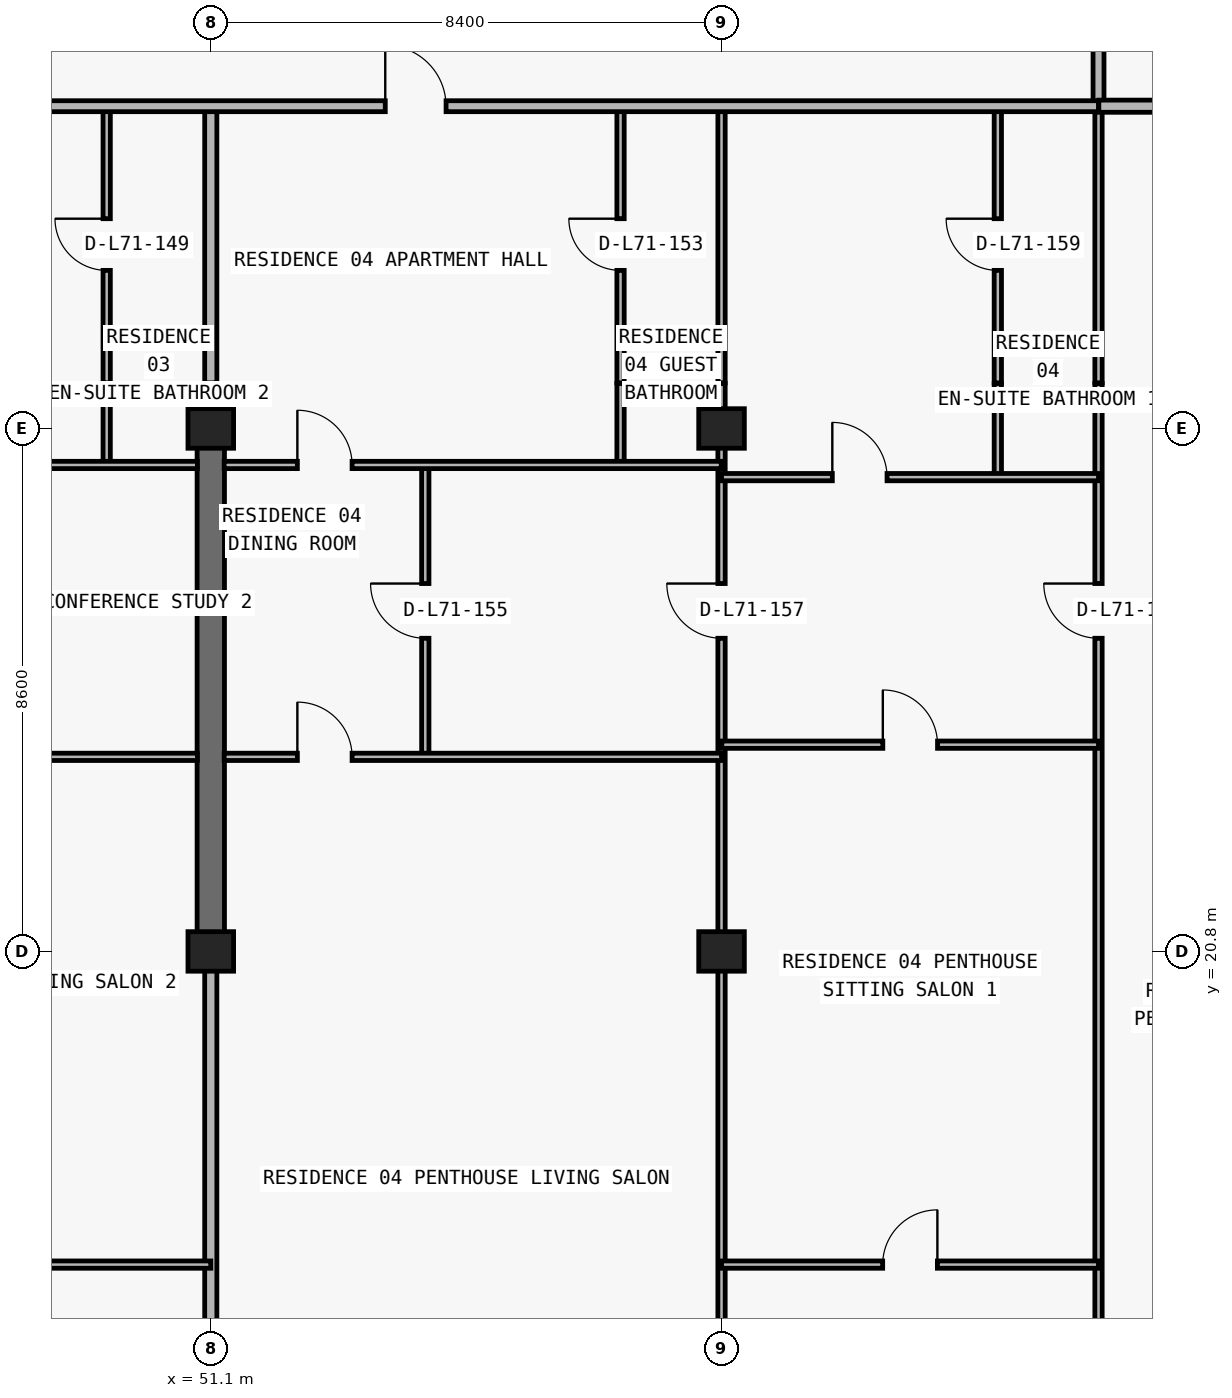
"""IFC4 building model, lengths in metres.
Left out: names, types, materials, properties, quantities, classifications, styles, units other than length and angle.
Written with IfcOpenShell. Run it as: python <this file> out.ifc"""

import sys

from ifc_helpers import new_model, si_unit, direction, frame, frame_2d, origin, origin_2d, place, context, subcontext, project, spatial, rectangle, extrude, element, fill, save


model = new_model("IFC4")
c1 = context("Model", 3, precision=1e-05, world=origin(), true_north=direction((0.0, 1.0)))
c2 = subcontext(c1, "Body", "Model", "MODEL_VIEW")
j1 = project(units=[si_unit("LENGTHUNIT", "METRE"), si_unit("PLANEANGLEUNIT", "RADIAN")], contexts=[c1])
p1 = place(None, origin())
s1 = spatial("IfcSite", under=j1, at=p1, CompositionType="ELEMENT")
p2 = place(p1, origin())
s2 = spatial("IfcBuilding", under=s1, at=p2, CompositionType="ELEMENT")
p3 = place(p2, frame((0.0, 0.0, 252.9)))
s3 = spatial("IfcBuildingStorey", under=s2, at=p3, CompositionType="ELEMENT", Elevation=252.9)
for number, where, z_axis, x_axis in (
    (1, (51.1, 20.8, 0.0), (0.0, 0.0, 1.0), (1.0, 0.0, 0.0)),
    (2, (59.5, 20.8, 0.0), (0.0, 0.0, 1.0), (1.0, 0.0, 0.0)),
    (3, (51.1, 29.4, 0.0), (0.0, 0.0, 1.0), (1.0, 0.0, 0.0)),
    (4, (59.5, 29.4, 0.0), (0.0, 0.0, 1.0), (1.0, 0.0, 0.0)),
):
    element("IfcColumn", number, at=place(p3, frame(where, z_axis=z_axis, x_axis=x_axis)), inside=s3, PredefinedType="COLUMN", context=c2, shape_type="SweptSolid", body=[
        extrude(rectangle(XDim=0.75, YDim=0.65, at=origin_2d()), origin(), (0.0, 0.0, 1.0), 3.05),
    ])
p4 = place(p3, frame((51.1, 20.8, 0.0), z_axis=(0.0, 0.0, 1.0), x_axis=(0.0, 1.0, 0.0)))
e5 = element("IfcWall", 5, at=p4, inside=s3, PredefinedType="SHEAR", context=c2, shape_type="SweptSolid", body=[
    extrude(rectangle(XDim=8.6, YDim=0.45, at=frame_2d((4.3, 0.0))), origin(), (0.0, 0.0, 1.0), 3.05),
])
p5 = place(p3, frame((49.388, 28.8, 0.0), z_axis=(0.0, 0.0, 1.0), x_axis=(0.0, 1.0, 0.0)))
e6 = element("IfcWall", 6, at=p5, inside=s3, PredefinedType="PARTITIONING", context=c2, shape_type="SweptSolid", body=[
    extrude(rectangle(XDim=1.34, YDim=0.12, at=frame_2d((0.67, 0.0))), origin(), (0.0, 0.0, 1.0), 3.05),
])
p6 = place(p3, frame((49.388, 30.15, 0.0), z_axis=(0.0, 0.0, 1.0), x_axis=(0.0, 1.0, 0.0)))
e7 = element("IfcWall", 7, at=p6, inside=s3, PredefinedType="PARTITIONING", context=c2, shape_type="SweptSolid", body=[
    extrude(rectangle(XDim=4.55, YDim=0.12, at=frame_2d((2.275, 0.0))), origin(), (0.0, 0.0, 1.0), 3.05),
])
p7 = place(p6, frame((1.85, 0.0, 0.0)))
e8 = element("IfcOpeningElement", 8, at=p7, cuts=e7, PredefinedType="OPENING", context=c2, shape_type="SweptSolid", body=[
    extrude(rectangle(XDim=0.85, YDim=2.1, at=frame_2d((0.425, 1.05))), frame((0.0, 0.07, 0.0), z_axis=(0.0, -1.0, 0.0), x_axis=(1.0, 0.0, 0.0)), (0.0, 0.0, 1.0), 0.14),
])
p8 = place(p3, frame((51.1, 13.34, 0.0), z_axis=(0.0, 0.0, 1.0), x_axis=(0.0, 1.0, 0.0)))
e9 = element("IfcWall", 9, at=p8, inside=s3, PredefinedType="PARTITIONING", context=c2, shape_type="SweptSolid", body=[
    extrude(rectangle(XDim=7.455, YDim=0.2, at=frame_2d((3.728, 0.0))), origin(), (0.0, 0.0, 1.0), 2.263),
])
p9 = place(p3, frame((51.1, 29.405, 0.0), z_axis=(0.0, 0.0, 1.0), x_axis=(0.0, 1.0, 0.0)))
e10 = element("IfcWall", 10, at=p9, inside=s3, PredefinedType="PARTITIONING", context=c2, shape_type="SweptSolid", body=[
    extrude(rectangle(XDim=0.735, YDim=0.2, at=frame_2d((0.367, 0.0))), origin(), (0.0, 0.0, 1.0), 2.335),
])
p10 = place(p3, frame((51.1, 30.15, 0.0), z_axis=(0.0, 0.0, 1.0), x_axis=(0.0, 1.0, 0.0)))
e11 = element("IfcWall", 11, at=p10, inside=s3, PredefinedType="PARTITIONING", context=c2, shape_type="SweptSolid", body=[
    extrude(rectangle(XDim=4.55, YDim=0.2, at=frame_2d((2.275, 0.0))), origin(), (0.0, 0.0, 1.0), 2.335),
])
p11 = place(p3, frame((54.628, 24.0, 0.0), z_axis=(0.0, 0.0, 1.0), x_axis=(0.0, 1.0, 0.0)))
e12 = element("IfcWall", 12, at=p11, inside=s3, PredefinedType="PARTITIONING", context=c2, shape_type="SweptSolid", body=[
    extrude(rectangle(XDim=4.8, YDim=0.12, at=frame_2d((2.4, 0.0))), origin(), (0.0, 0.0, 1.0), 3.05),
])
p12 = place(p11, frame((1.95, 0.0, 0.0)))
e13 = element("IfcOpeningElement", 13, at=p12, cuts=e12, PredefinedType="OPENING", context=c2, shape_type="SweptSolid", body=[
    extrude(rectangle(XDim=0.9, YDim=2.15, at=frame_2d((0.45, 1.075))), frame((0.0, 0.07, 0.0), z_axis=(0.0, -1.0, 0.0), x_axis=(1.0, 0.0, 0.0)), (0.0, 0.0, 1.0), 0.14),
])
p13 = place(p3, frame((57.839, 28.8, 0.0), z_axis=(0.0, 0.0, 1.0), x_axis=(0.0, 1.0, 0.0)))
e14 = element("IfcWall", 14, at=p13, inside=s3, PredefinedType="PARTITIONING", context=c2, shape_type="SweptSolid", body=[
    extrude(rectangle(XDim=1.34, YDim=0.12, at=frame_2d((0.67, 0.0))), origin(), (0.0, 0.0, 1.0), 3.05),
])
p14 = place(p3, frame((57.839, 30.15, 0.0), z_axis=(0.0, 0.0, 1.0), x_axis=(0.0, 1.0, 0.0)))
e15 = element("IfcWall", 15, at=p14, inside=s3, PredefinedType="PARTITIONING", context=c2, shape_type="SweptSolid", body=[
    extrude(rectangle(XDim=4.55, YDim=0.12, at=frame_2d((2.275, 0.0))), origin(), (0.0, 0.0, 1.0), 3.05),
])
p15 = place(p14, frame((1.85, 0.0, 0.0)))
e16 = element("IfcOpeningElement", 16, at=p15, cuts=e15, PredefinedType="OPENING", context=c2, shape_type="SweptSolid", body=[
    extrude(rectangle(XDim=0.85, YDim=2.1, at=frame_2d((0.425, 1.05))), frame((0.0, 0.07, 0.0), z_axis=(0.0, -1.0, 0.0), x_axis=(1.0, 0.0, 0.0)), (0.0, 0.0, 1.0), 0.14),
])
p16 = place(p3, frame((59.5, 13.34, 0.0), z_axis=(0.0, 0.0, 1.0), x_axis=(0.0, 1.0, 0.0)))
e17 = element("IfcWall", 17, at=p16, inside=s3, PredefinedType="PARTITIONING", context=c2, shape_type="SweptSolid", body=[
    extrude(rectangle(XDim=16.8, YDim=0.12, at=frame_2d((8.4, 0.0))), origin(), (0.0, 0.0, 1.0), 2.263),
])
p17 = place(p16, frame((12.61, 0.0, 0.0)))
e18 = element("IfcOpeningElement", 18, at=p17, cuts=e17, PredefinedType="OPENING", context=c2, shape_type="SweptSolid", body=[
    extrude(rectangle(XDim=0.9, YDim=2.15, at=frame_2d((0.45, 1.075))), frame((0.0, 0.07, 0.0), z_axis=(0.0, -1.0, 0.0), x_axis=(1.0, 0.0, 0.0)), (0.0, 0.0, 1.0), 0.14),
])
p18 = place(p3, frame((59.5, 30.15, 0.0), z_axis=(0.0, 0.0, 1.0), x_axis=(0.0, 1.0, 0.0)))
e19 = element("IfcWall", 19, at=p18, inside=s3, PredefinedType="PARTITIONING", context=c2, shape_type="SweptSolid", body=[
    extrude(rectangle(XDim=4.55, YDim=0.12, at=frame_2d((2.275, 0.0))), origin(), (0.0, 0.0, 1.0), 2.263),
])
p19 = place(p3, frame((64.044, 28.6, 0.0), z_axis=(0.0, 0.0, 1.0), x_axis=(0.0, 1.0, 0.0)))
e20 = element("IfcWall", 20, at=p19, inside=s3, PredefinedType="PARTITIONING", context=c2, shape_type="SweptSolid", body=[
    extrude(rectangle(XDim=1.54, YDim=0.12, at=frame_2d((0.77, 0.0))), origin(), (0.0, 0.0, 1.0), 3.05),
])
p20 = place(p3, frame((64.044, 30.15, 0.0), z_axis=(0.0, 0.0, 1.0), x_axis=(0.0, 1.0, 0.0)))
e21 = element("IfcWall", 21, at=p20, inside=s3, PredefinedType="PARTITIONING", context=c2, shape_type="SweptSolid", body=[
    extrude(rectangle(XDim=4.55, YDim=0.12, at=frame_2d((2.275, 0.0))), origin(), (0.0, 0.0, 1.0), 3.05),
])
p21 = place(p20, frame((1.85, 0.0, 0.0)))
e22 = element("IfcOpeningElement", 22, at=p21, cuts=e21, PredefinedType="OPENING", context=c2, shape_type="SweptSolid", body=[
    extrude(rectangle(XDim=0.85, YDim=2.1, at=frame_2d((0.425, 1.05))), frame((0.0, 0.07, 0.0), z_axis=(0.0, -1.0, 0.0), x_axis=(1.0, 0.0, 0.0)), (0.0, 0.0, 1.0), 0.14),
])
p22 = place(p3, frame((65.7, 13.42, 0.0), z_axis=(0.0, 0.0, 1.0), x_axis=(0.0, 1.0, 0.0)))
e23 = element("IfcWall", 23, at=p22, inside=s3, PredefinedType="PARTITIONING", context=c2, shape_type="SweptSolid", body=[
    extrude(rectangle(XDim=16.72, YDim=0.12, at=frame_2d((8.36, 0.0))), origin(), (0.0, 0.0, 1.0), 3.05),
])
p23 = place(p22, frame((12.53, 0.0, 0.0)))
e24 = element("IfcOpeningElement", 24, at=p23, cuts=e23, PredefinedType="OPENING", context=c2, shape_type="SweptSolid", body=[
    extrude(rectangle(XDim=0.9, YDim=2.15, at=frame_2d((0.45, 1.075))), frame((0.0, 0.07, 0.0), z_axis=(0.0, -1.0, 0.0), x_axis=(1.0, 0.0, 0.0)), (0.0, 0.0, 1.0), 0.14),
])
p24 = place(p3, frame((65.7, 30.15, 0.0), z_axis=(0.0, 0.0, 1.0), x_axis=(0.0, 1.0, 0.0)))
e25 = element("IfcWall", 25, at=p24, inside=s3, PredefinedType="PARTITIONING", context=c2, shape_type="SweptSolid", body=[
    extrude(rectangle(XDim=4.55, YDim=0.12, at=frame_2d((2.275, 0.0))), origin(), (0.0, 0.0, 1.0), 3.05),
])
p25 = place(p3, frame((65.7, 34.705, 0.0), z_axis=(0.0, 0.0, 1.0), x_axis=(0.0, 1.0, 0.0)))
e26 = element("IfcWall", 26, at=p25, inside=s3, PredefinedType="PARTITIONING", context=c2, shape_type="SweptSolid", body=[
    extrude(rectangle(XDim=2.295, YDim=0.18, at=frame_2d((1.147, 0.0))), origin(), (0.0, 0.0, 1.0), 3.05),
])
p26 = place(p3, frame((35.1, 15.65, 0.0), z_axis=(0.0, 0.0, 1.0), x_axis=(1.0, 0.0, 0.0)))
e27 = element("IfcWall", 27, at=p26, inside=s3, PredefinedType="PARTITIONING", context=c2, shape_type="SweptSolid", body=[
    extrude(rectangle(XDim=16.0, YDim=0.12, at=frame_2d((8.0, 0.0))), origin(), (0.0, 0.0, 1.0), 3.05),
])
p27 = place(p26, frame((3.35, 0.0, 0.0)))
e28 = element("IfcOpeningElement", 28, at=p27, cuts=e27, PredefinedType="OPENING", context=c2, shape_type="SweptSolid", body=[
    extrude(rectangle(XDim=0.9, YDim=2.15, at=frame_2d((0.45, 1.075))), frame((0.0, 0.07, 0.0), z_axis=(0.0, -1.0, 0.0), x_axis=(1.0, 0.0, 0.0)), (0.0, 0.0, 1.0), 0.14),
])
p28 = place(p26, frame((11.35, 0.0, 0.0)))
e29 = element("IfcOpeningElement", 29, at=p28, cuts=e27, PredefinedType="OPENING", context=c2, shape_type="SweptSolid", body=[
    extrude(rectangle(XDim=0.9, YDim=2.15, at=frame_2d((0.45, 1.075))), frame((0.0, 0.07, 0.0), z_axis=(0.0, -1.0, 0.0), x_axis=(1.0, 0.0, 0.0)), (0.0, 0.0, 1.0), 0.14),
])
p29 = place(p3, frame((59.5, 15.65, 0.0), z_axis=(0.0, 0.0, 1.0), x_axis=(1.0, 0.0, 0.0)))
e30 = element("IfcWall", 30, at=p29, inside=s3, PredefinedType="PARTITIONING", context=c2, shape_type="SweptSolid", body=[
    extrude(rectangle(XDim=6.2, YDim=0.12, at=frame_2d((3.1, 0.0))), origin(), (0.0, 0.0, 1.0), 3.05),
])
p30 = place(p29, frame((2.65, 0.0, 0.0)))
e31 = element("IfcOpeningElement", 31, at=p30, cuts=e30, PredefinedType="OPENING", context=c2, shape_type="SweptSolid", body=[
    extrude(rectangle(XDim=0.9, YDim=2.15, at=frame_2d((0.45, 1.075))), frame((0.0, 0.07, 0.0), z_axis=(0.0, -1.0, 0.0), x_axis=(1.0, 0.0, 0.0)), (0.0, 0.0, 1.0), 0.14),
])
p31 = place(p3, frame((42.7, 24.0, 0.0), z_axis=(0.0, 0.0, 1.0), x_axis=(1.0, 0.0, 0.0)))
e32 = element("IfcWall", 32, at=p31, inside=s3, PredefinedType="PARTITIONING", context=c2, shape_type="SweptSolid", body=[
    extrude(rectangle(XDim=8.18, YDim=0.12, at=frame_2d((4.09, 0.0))), origin(), (0.0, 0.0, 1.0), 3.05),
])
p32 = place(p31, frame((3.64, 0.0, 0.0)))
e33 = element("IfcOpeningElement", 33, at=p32, cuts=e32, PredefinedType="OPENING", context=c2, shape_type="SweptSolid", body=[
    extrude(rectangle(XDim=0.9, YDim=2.15, at=frame_2d((0.45, 1.075))), frame((0.0, 0.07, 0.0), z_axis=(0.0, -1.0, 0.0), x_axis=(1.0, 0.0, 0.0)), (0.0, 0.0, 1.0), 0.14),
])
p33 = place(p3, frame((51.32, 24.0, 0.0), z_axis=(0.0, 0.0, 1.0), x_axis=(1.0, 0.0, 0.0)))
e34 = element("IfcWall", 34, at=p33, inside=s3, PredefinedType="PARTITIONING", context=c2, shape_type="SweptSolid", body=[
    extrude(rectangle(XDim=8.18, YDim=0.12, at=frame_2d((4.09, 0.0))), origin(), (0.0, 0.0, 1.0), 3.05),
])
p34 = place(p33, frame((1.204, 0.0, 0.0)))
e35 = element("IfcOpeningElement", 35, at=p34, cuts=e34, PredefinedType="OPENING", context=c2, shape_type="SweptSolid", body=[
    extrude(rectangle(XDim=0.9, YDim=2.15, at=frame_2d((0.45, 1.075))), frame((0.0, 0.07, 0.0), z_axis=(0.0, -1.0, 0.0), x_axis=(1.0, 0.0, 0.0)), (0.0, 0.0, 1.0), 0.14),
])
p35 = place(p3, frame((59.505, 24.2, 0.0), z_axis=(0.0, 0.0, 1.0), x_axis=(1.0, 0.0, 0.0)))
e36 = element("IfcWall", 36, at=p35, inside=s3, PredefinedType="PARTITIONING", context=c2, shape_type="SweptSolid", body=[
    extrude(rectangle(XDim=6.195, YDim=0.12, at=frame_2d((3.098, 0.0))), origin(), (0.0, 0.0, 1.0), 3.05),
])
p36 = place(p35, frame((2.647, 0.0, 0.0)))
e37 = element("IfcOpeningElement", 37, at=p36, cuts=e36, PredefinedType="OPENING", context=c2, shape_type="SweptSolid", body=[
    extrude(rectangle(XDim=0.9, YDim=2.15, at=frame_2d((0.45, 1.075))), frame((0.0, 0.07, 0.0), z_axis=(0.0, -1.0, 0.0), x_axis=(1.0, 0.0, 0.0)), (0.0, 0.0, 1.0), 0.14),
])
p37 = place(p3, frame((59.5, 28.6, 0.0), z_axis=(0.0, 0.0, 1.0), x_axis=(1.0, 0.0, 0.0)))
e38 = element("IfcWall", 38, at=p37, inside=s3, PredefinedType="PARTITIONING", context=c2, shape_type="SweptSolid", body=[
    extrude(rectangle(XDim=6.2, YDim=0.12, at=frame_2d((3.1, 0.0))), origin(), (0.0, 0.0, 1.0), 3.05),
])
p38 = place(p37, frame((1.822, 0.0, 0.0)))
e39 = element("IfcOpeningElement", 39, at=p38, cuts=e38, PredefinedType="OPENING", context=c2, shape_type="SweptSolid", body=[
    extrude(rectangle(XDim=0.9, YDim=2.15, at=frame_2d((0.45, 1.075))), frame((0.0, 0.07, 0.0), z_axis=(0.0, -1.0, 0.0), x_axis=(1.0, 0.0, 0.0)), (0.0, 0.0, 1.0), 0.14),
])
p39 = place(p3, frame((42.705, 28.8, 0.0), z_axis=(0.0, 0.0, 1.0), x_axis=(1.0, 0.0, 0.0)))
e40 = element("IfcWall", 40, at=p39, inside=s3, PredefinedType="PARTITIONING", context=c2, shape_type="SweptSolid", body=[
    extrude(rectangle(XDim=8.175, YDim=0.12, at=frame_2d((4.087, 0.0))), origin(), (0.0, 0.0, 1.0), 3.05),
])
p40 = place(p39, frame((2.892, 0.0, 0.0)))
e41 = element("IfcOpeningElement", 41, at=p40, cuts=e40, PredefinedType="OPENING", context=c2, shape_type="SweptSolid", body=[
    extrude(rectangle(XDim=0.9, YDim=2.15, at=frame_2d((0.45, 1.075))), frame((0.0, 0.07, 0.0), z_axis=(0.0, -1.0, 0.0), x_axis=(1.0, 0.0, 0.0)), (0.0, 0.0, 1.0), 0.14),
])
p41 = place(p3, frame((51.32, 28.8, 0.0), z_axis=(0.0, 0.0, 1.0), x_axis=(1.0, 0.0, 0.0)))
e42 = element("IfcWall", 42, at=p41, inside=s3, PredefinedType="PARTITIONING", context=c2, shape_type="SweptSolid", body=[
    extrude(rectangle(XDim=8.175, YDim=0.12, at=frame_2d((4.087, 0.0))), origin(), (0.0, 0.0, 1.0), 3.05),
])
p42 = place(p41, frame((1.204, 0.0, 0.0)))
e43 = element("IfcOpeningElement", 43, at=p42, cuts=e42, PredefinedType="OPENING", context=c2, shape_type="SweptSolid", body=[
    extrude(rectangle(XDim=0.9, YDim=2.15, at=frame_2d((0.45, 1.075))), frame((0.0, 0.07, 0.0), z_axis=(0.0, -1.0, 0.0), x_axis=(1.0, 0.0, 0.0)), (0.0, 0.0, 1.0), 0.14),
])
p43 = place(p3, frame((26.7, 34.7, 0.0), z_axis=(0.0, 0.0, 1.0), x_axis=(1.0, 0.0, 0.0)))
e44 = element("IfcWall", 44, at=p43, inside=s3, PredefinedType="PARTITIONING", context=c2, shape_type="SweptSolid", body=[
    extrude(rectangle(XDim=39.0, YDim=0.18, at=frame_2d((19.5, 0.0))), origin(), (0.0, 0.0, 1.0), 3.05),
])
p44 = place(p43, frame((2.827, 0.0, 0.0)))
e45 = element("IfcOpeningElement", 45, at=p44, cuts=e44, PredefinedType="OPENING", context=c2, shape_type="SweptSolid", body=[
    extrude(rectangle(XDim=1.0, YDim=2.2, at=frame_2d((0.5, 1.1))), frame((0.0, 0.1, 0.0), z_axis=(0.0, -1.0, 0.0), x_axis=(1.0, 0.0, 0.0)), (0.0, 0.0, 1.0), 0.2),
])
p45 = place(p43, frame((27.27, 0.0, 0.0)))
e46 = element("IfcOpeningElement", 46, at=p45, cuts=e44, PredefinedType="OPENING", context=c2, shape_type="SweptSolid", body=[
    extrude(rectangle(XDim=1.0, YDim=2.2, at=frame_2d((0.5, 1.1))), frame((0.0, 0.1, 0.0), z_axis=(0.0, -1.0, 0.0), x_axis=(1.0, 0.0, 0.0)), (0.0, 0.0, 1.0), 0.2),
])
p46 = place(p3, frame((65.705, 34.7, 0.0), z_axis=(0.0, 0.0, 1.0), x_axis=(1.0, 0.0, 0.0)))
e47 = element("IfcWall", 47, at=p46, inside=s3, PredefinedType="PARTITIONING", context=c2, shape_type="SweptSolid", body=[
    extrude(rectangle(XDim=3.7, YDim=0.2, at=frame_2d((1.85, 0.0))), origin(), (0.0, 0.0, 1.0), 3.05),
])
p47 = place(p7, origin())
e48 = element("IfcDoor", 48, at=p47, inside=s3, OperationType="SINGLE_SWING_RIGHT", PredefinedType="DOOR", context=c2, shape_type="SweptSolid", body=[
    extrude(rectangle(XDim=0.85, YDim=2.1, at=frame_2d((0.425, 1.05))), frame((0.0, 0.025, 0.0), z_axis=(0.0, -1.0, 0.0), x_axis=(1.0, 0.0, 0.0)), (0.0, 0.0, 1.0), 0.05),
])
fill(e8, e48)
p48 = place(p45, origin())
e49 = element("IfcDoor", 49, at=p48, inside=s3, OperationType="SINGLE_SWING_LEFT", PredefinedType="DOOR", context=c2, shape_type="SweptSolid", body=[
    extrude(rectangle(XDim=1.0, YDim=2.2, at=frame_2d((0.5, 1.1))), frame((0.0, 0.025, 0.0), z_axis=(0.0, -1.0, 0.0), x_axis=(1.0, 0.0, 0.0)), (0.0, 0.0, 1.0), 0.05),
])
fill(e46, e49)
p49 = place(p15, origin())
e50 = element("IfcDoor", 50, at=p49, inside=s3, OperationType="SINGLE_SWING_RIGHT", PredefinedType="DOOR", context=c2, shape_type="SweptSolid", body=[
    extrude(rectangle(XDim=0.85, YDim=2.1, at=frame_2d((0.425, 1.05))), frame((0.0, 0.025, 0.0), z_axis=(0.0, -1.0, 0.0), x_axis=(1.0, 0.0, 0.0)), (0.0, 0.0, 1.0), 0.05),
])
fill(e16, e50)
p50 = place(p42, origin())
e51 = element("IfcDoor", 51, at=p50, inside=s3, OperationType="SINGLE_SWING_LEFT", PredefinedType="DOOR", context=c2, shape_type="SweptSolid", body=[
    extrude(rectangle(XDim=0.9, YDim=2.15, at=frame_2d((0.45, 1.075))), frame((0.0, 0.025, 0.0), z_axis=(0.0, -1.0, 0.0), x_axis=(1.0, 0.0, 0.0)), (0.0, 0.0, 1.0), 0.05),
])
fill(e43, e51)
p51 = place(p12, origin())
e52 = element("IfcDoor", 52, at=p51, inside=s3, OperationType="SINGLE_SWING_RIGHT", PredefinedType="DOOR", context=c2, shape_type="SweptSolid", body=[
    extrude(rectangle(XDim=0.9, YDim=2.15, at=frame_2d((0.45, 1.075))), frame((0.0, 0.025, 0.0), z_axis=(0.0, -1.0, 0.0), x_axis=(1.0, 0.0, 0.0)), (0.0, 0.0, 1.0), 0.05),
])
fill(e13, e52)
p52 = place(p34, origin())
e53 = element("IfcDoor", 53, at=p52, inside=s3, OperationType="SINGLE_SWING_LEFT", PredefinedType="DOOR", context=c2, shape_type="SweptSolid", body=[
    extrude(rectangle(XDim=0.9, YDim=2.15, at=frame_2d((0.45, 1.075))), frame((0.0, 0.025, 0.0), z_axis=(0.0, -1.0, 0.0), x_axis=(1.0, 0.0, 0.0)), (0.0, 0.0, 1.0), 0.05),
])
fill(e35, e53)
p53 = place(p17, origin())
e54 = element("IfcDoor", 54, at=p53, inside=s3, OperationType="SINGLE_SWING_RIGHT", PredefinedType="DOOR", context=c2, shape_type="SweptSolid", body=[
    extrude(rectangle(XDim=0.9, YDim=2.15, at=frame_2d((0.45, 1.075))), frame((0.0, 0.025, 0.0), z_axis=(0.0, -1.0, 0.0), x_axis=(1.0, 0.0, 0.0)), (0.0, 0.0, 1.0), 0.05),
])
fill(e18, e54)
p54 = place(p38, origin())
e55 = element("IfcDoor", 55, at=p54, inside=s3, OperationType="SINGLE_SWING_LEFT", PredefinedType="DOOR", context=c2, shape_type="SweptSolid", body=[
    extrude(rectangle(XDim=0.9, YDim=2.15, at=frame_2d((0.45, 1.075))), frame((0.0, 0.025, 0.0), z_axis=(0.0, -1.0, 0.0), x_axis=(1.0, 0.0, 0.0)), (0.0, 0.0, 1.0), 0.05),
])
fill(e39, e55)
p55 = place(p21, origin())
e56 = element("IfcDoor", 56, at=p55, inside=s3, OperationType="SINGLE_SWING_RIGHT", PredefinedType="DOOR", context=c2, shape_type="SweptSolid", body=[
    extrude(rectangle(XDim=0.85, YDim=2.1, at=frame_2d((0.425, 1.05))), frame((0.0, 0.025, 0.0), z_axis=(0.0, -1.0, 0.0), x_axis=(1.0, 0.0, 0.0)), (0.0, 0.0, 1.0), 0.05),
])
fill(e22, e56)
p56 = place(p36, origin())
e57 = element("IfcDoor", 57, at=p56, inside=s3, OperationType="SINGLE_SWING_LEFT", PredefinedType="DOOR", context=c2, shape_type="SweptSolid", body=[
    extrude(rectangle(XDim=0.9, YDim=2.15, at=frame_2d((0.45, 1.075))), frame((0.0, 0.025, 0.0), z_axis=(0.0, -1.0, 0.0), x_axis=(1.0, 0.0, 0.0)), (0.0, 0.0, 1.0), 0.05),
])
fill(e37, e57)
p57 = place(p30, origin())
e58 = element("IfcDoor", 58, at=p57, inside=s3, OperationType="SINGLE_SWING_RIGHT", PredefinedType="DOOR", context=c2, shape_type="SweptSolid", body=[
    extrude(rectangle(XDim=0.9, YDim=2.15, at=frame_2d((0.45, 1.075))), frame((0.0, 0.025, 0.0), z_axis=(0.0, -1.0, 0.0), x_axis=(1.0, 0.0, 0.0)), (0.0, 0.0, 1.0), 0.05),
])
fill(e31, e58)
p58 = place(p23, origin())
e59 = element("IfcDoor", 59, at=p58, inside=s3, OperationType="SINGLE_SWING_RIGHT", PredefinedType="DOOR", context=c2, shape_type="SweptSolid", body=[
    extrude(rectangle(XDim=0.9, YDim=2.15, at=frame_2d((0.45, 1.075))), frame((0.0, 0.025, 0.0), z_axis=(0.0, -1.0, 0.0), x_axis=(1.0, 0.0, 0.0)), (0.0, 0.0, 1.0), 0.05),
])
fill(e24, e59)
save(model, sys.argv[1])
